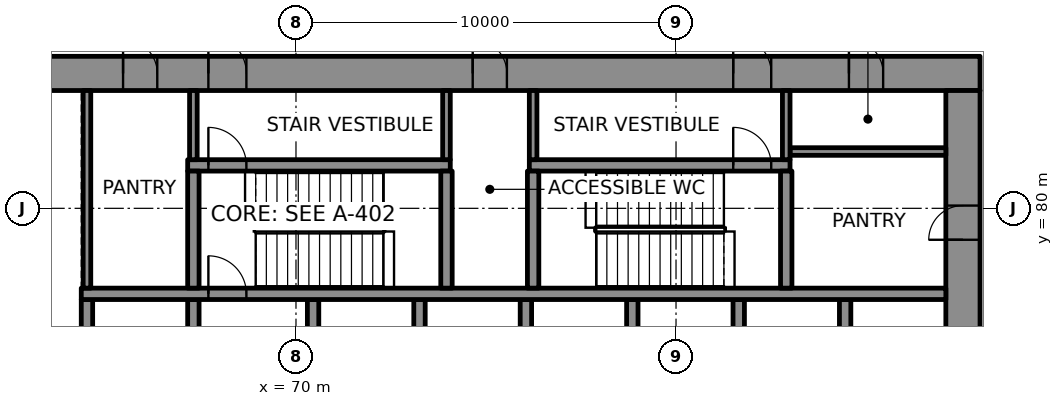
"""IFC4 building model, lengths in metres.
Left out: names, types, materials, properties, quantities, classifications, styles, units other than length and angle.
Written with IfcOpenShell. Run it as: python <this file> out.ifc"""

import sys

from ifc_helpers import new_model, si_unit, direction, frame, frame_2d, origin, place, context, subcontext, project, spatial, rectangle, extrude, element, fill, save


model = new_model("IFC4")
c1 = context("Model", 3, precision=1e-05, world=origin(), true_north=direction((0.0, 1.0)))
c2 = subcontext(c1, "Body", "Model", "MODEL_VIEW")
j1 = project(units=[si_unit("LENGTHUNIT", "METRE"), si_unit("PLANEANGLEUNIT", "RADIAN")], contexts=[c1])
p1 = place(None, origin())
s1 = spatial("IfcSite", under=j1, at=p1, CompositionType="ELEMENT")
p2 = place(p1, origin())
s2 = spatial("IfcBuilding", under=s1, at=p2, CompositionType="ELEMENT")
p3 = place(p2, frame((0.0, 0.0, 17.2)))
s3 = spatial("IfcBuildingStorey", under=s2, at=p3, CompositionType="ELEMENT", Elevation=17.2)
p4 = place(p3, frame((62.0, 83.55, 0.0), z_axis=(0.0, 0.0, 1.0), x_axis=(1.0, 0.0, 0.0)))
e1 = element("IfcWall", 1, at=p4, inside=s3, PredefinedType="SHEAR", context=c2, shape_type="SweptSolid", body=[
    extrude(rectangle(XDim=26.0, YDim=0.9, at=frame_2d((13.0, 0.0))), origin(), (0.0, 0.0, 1.0), 4.3),
])
p5 = place(p4, frame((5.695, 0.0, 0.0)))
e2 = element("IfcOpeningElement", 2, at=p5, cuts=e1, PredefinedType="OPENING", context=c2, shape_type="SweptSolid", body=[
    extrude(rectangle(XDim=1.0, YDim=2.1, at=frame_2d((0.5, 1.05))), frame((0.0, 0.46, 0.0), z_axis=(0.0, -1.0, 0.0), x_axis=(1.0, 0.0, 0.0)), (0.0, 0.0, 1.0), 0.92),
])
p6 = place(p4, frame((19.505, 0.0, 0.0)))
e3 = element("IfcOpeningElement", 3, at=p6, cuts=e1, PredefinedType="OPENING", context=c2, shape_type="SweptSolid", body=[
    extrude(rectangle(XDim=1.0, YDim=2.1, at=frame_2d((0.5, 1.05))), frame((0.0, 0.46, 0.0), z_axis=(0.0, -1.0, 0.0), x_axis=(1.0, 0.0, 0.0)), (0.0, 0.0, 1.0), 0.92),
])
p7 = place(p4, frame((3.45, 0.0, 0.0)))
e4 = element("IfcOpeningElement", 4, at=p7, cuts=e1, PredefinedType="OPENING", context=c2, shape_type="SweptSolid", body=[
    extrude(rectangle(XDim=0.9, YDim=2.1, at=frame_2d((0.45, 1.05))), frame((0.0, 0.46, 0.0), z_axis=(0.0, -1.0, 0.0), x_axis=(1.0, 0.0, 0.0)), (0.0, 0.0, 1.0), 0.92),
])
p8 = place(p4, frame((12.65, 0.0, 0.0)))
e5 = element("IfcOpeningElement", 5, at=p8, cuts=e1, PredefinedType="OPENING", context=c2, shape_type="SweptSolid", body=[
    extrude(rectangle(XDim=0.9, YDim=2.1, at=frame_2d((0.45, 1.05))), frame((0.0, 0.46, 0.0), z_axis=(0.0, -1.0, 0.0), x_axis=(1.0, 0.0, 0.0)), (0.0, 0.0, 1.0), 0.92),
])
p9 = place(p4, frame((22.55, 0.0, 0.0)))
e6 = element("IfcOpeningElement", 6, at=p9, cuts=e1, PredefinedType="OPENING", context=c2, shape_type="SweptSolid", body=[
    extrude(rectangle(XDim=0.9, YDim=2.1, at=frame_2d((0.45, 1.05))), frame((0.0, 0.46, 0.0), z_axis=(0.0, -1.0, 0.0), x_axis=(1.0, 0.0, 0.0)), (0.0, 0.0, 1.0), 0.92),
])
p10 = place(p3, frame((87.55, 66.9, 0.0), z_axis=(0.0, 0.0, 1.0), x_axis=(0.0, 1.0, 0.0)))
e7 = element("IfcWall", 7, at=p10, inside=s3, PredefinedType="SHEAR", context=c2, shape_type="SweptSolid", body=[
    extrude(rectangle(XDim=16.2, YDim=0.9, at=frame_2d((8.1, 0.0))), origin(), (0.0, 0.0, 1.0), 4.3),
])
p11 = place(p10, frame((5.5, 0.0, 0.0)))
e8 = element("IfcOpeningElement", 8, at=p11, cuts=e7, PredefinedType="OPENING", context=c2, shape_type="SweptSolid", body=[
    extrude(rectangle(XDim=1.8, YDim=2.1, at=frame_2d((0.9, 1.05))), frame((0.0, 0.46, 0.0), z_axis=(0.0, -1.0, 0.0), x_axis=(1.0, 0.0, 0.0)), (0.0, 0.0, 1.0), 0.92),
])
p12 = place(p10, frame((12.272, 0.0, 0.0)))
e9 = element("IfcOpeningElement", 9, at=p12, cuts=e7, PredefinedType="OPENING", context=c2, shape_type="SweptSolid", body=[
    extrude(rectangle(XDim=0.9, YDim=2.1, at=frame_2d((0.45, 1.05))), frame((0.0, 0.46, 0.0), z_axis=(0.0, -1.0, 0.0), x_axis=(1.0, 0.0, 0.0)), (0.0, 0.0, 1.0), 0.92),
])
for number, where, z_axis, x_axis in (
    (10, (64.5, 75.0, 0.0), (0.0, 0.0, 1.0), (0.0, 1.0, 0.0)),
    (11, (67.3, 75.0, 0.0), (0.0, 0.0, 1.0), (0.0, 1.0, 0.0)),
):
    element("IfcWall", number, at=place(p3, frame(where, z_axis=z_axis, x_axis=x_axis)), inside=s3, PredefinedType="SHEAR", context=c2, shape_type="SweptSolid", body=[
        extrude(rectangle(XDim=2.6, YDim=0.3, at=frame_2d((1.3, 0.0))), origin(), (0.0, 0.0, 1.0), 4.3),
    ])
p13 = place(p3, frame((70.45, 75.0, 0.0), z_axis=(0.0, 0.0, 1.0), x_axis=(0.0, 1.0, 0.0)))
e12 = element("IfcWall", 12, at=p13, inside=s3, PredefinedType="SHEAR", context=c2, shape_type="SweptSolid", body=[
    extrude(rectangle(XDim=2.6, YDim=0.3, at=frame_2d((1.3, 0.0))), origin(), (0.0, 0.0, 1.0), 4.3),
])
p14 = place(p13, frame((0.15, 0.0, 0.0)))
e13 = element("IfcOpeningElement", 13, at=p14, cuts=e12, PredefinedType="OPENING", context=c2, shape_type="SweptSolid", body=[
    extrude(rectangle(XDim=1.1, YDim=2.1, at=frame_2d((0.55, 1.05))), frame((0.0, 0.16, 0.0), z_axis=(0.0, -1.0, 0.0), x_axis=(1.0, 0.0, 0.0)), (0.0, 0.0, 1.0), 0.32),
])
for number, where, z_axis, x_axis in (
    (14, (73.25, 75.0, 0.0), (0.0, 0.0, 1.0), (0.0, 1.0, 0.0)),
    (15, (76.05, 75.0, 0.0), (0.0, 0.0, 1.0), (0.0, 1.0, 0.0)),
    (16, (78.85, 75.0, 0.0), (0.0, 0.0, 1.0), (0.0, 1.0, 0.0)),
    (17, (81.65, 75.0, 0.0), (0.0, 0.0, 1.0), (0.0, 1.0, 0.0)),
    (18, (84.45, 75.0, 0.0), (0.0, 0.0, 1.0), (0.0, 1.0, 0.0)),
):
    element("IfcWall", number, at=place(p3, frame(where, z_axis=z_axis, x_axis=x_axis)), inside=s3, PredefinedType="SHEAR", context=c2, shape_type="SweptSolid", body=[
        extrude(rectangle(XDim=2.6, YDim=0.3, at=frame_2d((1.3, 0.0))), origin(), (0.0, 0.0, 1.0), 4.3),
    ])
p15 = place(p3, frame((64.35, 77.75, 0.0), z_axis=(0.0, 0.0, 1.0), x_axis=(1.0, 0.0, 0.0)))
e19 = element("IfcWall", 19, at=p15, inside=s3, PredefinedType="SHEAR", context=c2, shape_type="SweptSolid", body=[
    extrude(rectangle(XDim=22.75, YDim=0.3, at=frame_2d((11.375, 0.0))), origin(), (0.0, 0.0, 1.0), 4.3),
])
p16 = place(p15, frame((3.345, 0.0, 0.0)))
e20 = element("IfcOpeningElement", 20, at=p16, cuts=e19, PredefinedType="OPENING", context=c2, shape_type="SweptSolid", body=[
    extrude(rectangle(XDim=1.0, YDim=2.1, at=frame_2d((0.5, 1.05))), frame((0.0, 0.16, 0.0), z_axis=(0.0, -1.0, 0.0), x_axis=(1.0, 0.0, 0.0)), (0.0, 0.0, 1.0), 0.32),
])
p17 = place(p3, frame((67.15, 81.13, 0.0), z_axis=(0.0, 0.0, 1.0), x_axis=(1.0, 0.0, 0.0)))
e21 = element("IfcWall", 21, at=p17, inside=s3, PredefinedType="SHEAR", context=c2, shape_type="SweptSolid", body=[
    extrude(rectangle(XDim=6.91, YDim=0.3, at=frame_2d((3.455, 0.0))), origin(), (0.0, 0.0, 1.0), 4.3),
])
p18 = place(p17, frame((0.545, 0.0, 0.0)))
e22 = element("IfcOpeningElement", 22, at=p18, cuts=e21, PredefinedType="OPENING", context=c2, shape_type="SweptSolid", body=[
    extrude(rectangle(XDim=1.0, YDim=2.1, at=frame_2d((0.5, 1.05))), frame((0.0, 0.16, 0.0), z_axis=(0.0, -1.0, 0.0), x_axis=(1.0, 0.0, 0.0)), (0.0, 0.0, 1.0), 0.32),
])
p19 = place(p3, frame((76.14, 81.13, 0.0), z_axis=(0.0, 0.0, 1.0), x_axis=(1.0, 0.0, 0.0)))
e23 = element("IfcWall", 23, at=p19, inside=s3, PredefinedType="SHEAR", context=c2, shape_type="SweptSolid", body=[
    extrude(rectangle(XDim=6.86, YDim=0.3, at=frame_2d((3.43, 0.0))), origin(), (0.0, 0.0, 1.0), 4.3),
])
p20 = place(p19, frame((5.365, 0.0, 0.0)))
e24 = element("IfcOpeningElement", 24, at=p20, cuts=e23, PredefinedType="OPENING", context=c2, shape_type="SweptSolid", body=[
    extrude(rectangle(XDim=1.0, YDim=2.1, at=frame_2d((0.5, 1.05))), frame((0.0, 0.16, 0.0), z_axis=(0.0, -1.0, 0.0), x_axis=(1.0, 0.0, 0.0)), (0.0, 0.0, 1.0), 0.32),
])
for number, where, z_axis, x_axis in (
    (25, (67.3, 77.9, 0.0), (0.0, 0.0, 1.0), (0.0, 1.0, 0.0)),
    (26, (73.96, 77.9, 0.0), (0.0, 0.0, 1.0), (0.0, 1.0, 0.0)),
    (27, (76.24, 77.9, 0.0), (0.0, 0.0, 1.0), (0.0, 1.0, 0.0)),
    (28, (82.9, 77.9, 0.0), (0.0, 0.0, 1.0), (0.0, 1.0, 0.0)),
):
    element("IfcWall", number, at=place(p3, frame(where, z_axis=z_axis, x_axis=x_axis)), inside=s3, PredefinedType="SHEAR", context=c2, shape_type="SweptSolid", body=[
        extrude(rectangle(XDim=3.08, YDim=0.3, at=frame_2d((1.54, 0.0))), origin(), (0.0, 0.0, 1.0), 4.3),
    ])
p21 = place(p3, frame((83.0, 81.495, 0.0), z_axis=(0.0, 0.0, 1.0), x_axis=(1.0, 0.0, 0.0)))
e29 = element("IfcWall", 29, at=p21, inside=s3, PredefinedType="PARTITIONING", context=c2, shape_type="SweptSolid", body=[
    extrude(rectangle(XDim=4.1, YDim=0.2, at=frame_2d((2.05, 0.0))), origin(), (0.0, 0.0, 1.0), 4.3),
])
p22 = place(p3, frame((64.5, 77.9, 0.0), z_axis=(0.0, 0.0, 1.0), x_axis=(0.0, 1.0, 0.0)))
e30 = element("IfcWall", 30, at=p22, inside=s3, PredefinedType="PARTITIONING", context=c2, shape_type="SweptSolid", body=[
    extrude(rectangle(XDim=5.2, YDim=0.2, at=frame_2d((2.6, 0.0))), origin(), (0.0, 0.0, 1.0), 4.3),
])
for number, where, z_axis, x_axis in (
    (31, (67.3, 81.28, 0.0), (0.0, 0.0, 1.0), (0.0, 1.0, 0.0)),
    (32, (73.96, 81.28, 0.0), (0.0, 0.0, 1.0), (0.0, 1.0, 0.0)),
    (33, (76.24, 81.28, 0.0), (0.0, 0.0, 1.0), (0.0, 1.0, 0.0)),
    (34, (82.9, 81.28, 0.0), (0.0, 0.0, 1.0), (0.0, 1.0, 0.0)),
):
    element("IfcWall", number, at=place(p3, frame(where, z_axis=z_axis, x_axis=x_axis)), inside=s3, PredefinedType="PARTITIONING", context=c2, shape_type="SweptSolid", body=[
        extrude(rectangle(XDim=1.82, YDim=0.2, at=frame_2d((0.91, 0.0))), origin(), (0.0, 0.0, 1.0), 4.3),
    ])
p23 = place(p3, frame((107.106, 62.36, 0.0), z_axis=(0.0, 0.0, 1.0), x_axis=(-0.49999992739, 0.866025445706, 0.0)))
e35 = element("IfcWall", 35, at=p23, inside=s3, PredefinedType="SOLIDWALL", context=c2, shape_type="SweptSolid", body=[
    extrude(rectangle(XDim=54.0, YDim=0.4, at=frame_2d((27.0, 0.0))), origin(), (0.0, 0.0, 1.0), 4.24),
])
p24 = place(p3, frame((112.496, 65.725, 0.0), z_axis=(0.0, 0.0, 1.0), x_axis=(-0.499998673217, 0.866026169802, 0.0)))
e36 = element("IfcWall", 36, at=p24, inside=s3, PredefinedType="PARTITIONING", context=c2, shape_type="SweptSolid", body=[
    extrude(rectangle(XDim=53.48, YDim=0.2, at=frame_2d((26.74, 0.0))), origin(), (0.0, 0.0, 1.0), 4.24),
])
p25 = place(p24, frame((13.08, 0.0, 0.0)))
e37 = element("IfcOpeningElement", 37, at=p25, cuts=e36, PredefinedType="OPENING", context=c2, shape_type="SweptSolid", body=[
    extrude(rectangle(XDim=1.0, YDim=2.1, at=frame_2d((0.5, 1.05))), frame((0.0, 0.11, 0.0), z_axis=(0.0, -1.0, 0.0), x_axis=(1.0, 0.0, 0.0)), (0.0, 0.0, 1.0), 0.22),
])
p26 = place(p24, frame((26.28, 0.0, 0.0)))
e38 = element("IfcOpeningElement", 38, at=p26, cuts=e36, PredefinedType="OPENING", context=c2, shape_type="SweptSolid", body=[
    extrude(rectangle(XDim=1.0, YDim=2.1, at=frame_2d((0.5, 1.05))), frame((0.0, 0.11, 0.0), z_axis=(0.0, -1.0, 0.0), x_axis=(1.0, 0.0, 0.0)), (0.0, 0.0, 1.0), 0.22),
])
p27 = place(p24, frame((43.88, 0.0, 0.0)))
e39 = element("IfcOpeningElement", 39, at=p27, cuts=e36, PredefinedType="OPENING", context=c2, shape_type="SweptSolid", body=[
    extrude(rectangle(XDim=1.0, YDim=2.1, at=frame_2d((0.5, 1.05))), frame((0.0, 0.11, 0.0), z_axis=(0.0, -1.0, 0.0), x_axis=(1.0, 0.0, 0.0)), (0.0, 0.0, 1.0), 0.22),
])
p28 = place(p24, frame((50.58, 0.0, 0.0)))
e40 = element("IfcOpeningElement", 40, at=p28, cuts=e36, PredefinedType="OPENING", context=c2, shape_type="SweptSolid", body=[
    extrude(rectangle(XDim=1.0, YDim=2.1, at=frame_2d((0.5, 1.05))), frame((0.0, 0.11, 0.0), z_axis=(0.0, -1.0, 0.0), x_axis=(1.0, 0.0, 0.0)), (0.0, 0.0, 1.0), 0.22),
])
p29 = place(p16, origin())
e41 = element("IfcDoor", 41, at=p29, inside=s3, OperationType="SINGLE_SWING_LEFT", PredefinedType="DOOR", context=c2, shape_type="SweptSolid", body=[
    extrude(rectangle(XDim=1.0, YDim=2.1, at=frame_2d((0.5, 1.05))), frame((0.0, 0.025, 0.0), z_axis=(0.0, -1.0, 0.0), x_axis=(1.0, 0.0, 0.0)), (0.0, 0.0, 1.0), 0.05),
])
fill(e20, e41)
p30 = place(p18, origin())
e42 = element("IfcDoor", 42, at=p30, inside=s3, OperationType="SINGLE_SWING_RIGHT", PredefinedType="DOOR", context=c2, shape_type="SweptSolid", body=[
    extrude(rectangle(XDim=1.0, YDim=2.1, at=frame_2d((0.5, 1.05))), frame((0.0, 0.025, 0.0), z_axis=(0.0, -1.0, 0.0), x_axis=(1.0, 0.0, 0.0)), (0.0, 0.0, 1.0), 0.05),
])
fill(e22, e42)
p31 = place(p5, origin())
e43 = element("IfcDoor", 43, at=p31, inside=s3, OperationType="SINGLE_SWING_LEFT", PredefinedType="DOOR", context=c2, shape_type="SweptSolid", body=[
    extrude(rectangle(XDim=1.0, YDim=2.1, at=frame_2d((0.5, 1.05))), frame((0.0, 0.17, 0.0), z_axis=(0.0, -1.0, 0.0), x_axis=(1.0, 0.0, 0.0)), (0.0, 0.0, 1.0), 0.34),
])
fill(e2, e43)
p32 = place(p20, origin())
e44 = element("IfcDoor", 44, at=p32, inside=s3, OperationType="SINGLE_SWING_RIGHT", PredefinedType="DOOR", context=c2, shape_type="SweptSolid", body=[
    extrude(rectangle(XDim=1.0, YDim=2.1, at=frame_2d((0.5, 1.05))), frame((0.0, 0.025, 0.0), z_axis=(0.0, -1.0, 0.0), x_axis=(1.0, 0.0, 0.0)), (0.0, 0.0, 1.0), 0.05),
])
fill(e24, e44)
p33 = place(p6, origin())
e45 = element("IfcDoor", 45, at=p33, inside=s3, OperationType="SINGLE_SWING_LEFT", PredefinedType="DOOR", context=c2, shape_type="SweptSolid", body=[
    extrude(rectangle(XDim=1.0, YDim=2.1, at=frame_2d((0.5, 1.05))), frame((0.0, 0.17, 0.0), z_axis=(0.0, -1.0, 0.0), x_axis=(1.0, 0.0, 0.0)), (0.0, 0.0, 1.0), 0.34),
])
fill(e3, e45)
p34 = place(p7, origin())
e46 = element("IfcDoor", 46, at=p34, inside=s3, OperationType="SINGLE_SWING_RIGHT", PredefinedType="DOOR", context=c2, shape_type="SweptSolid", body=[
    extrude(rectangle(XDim=0.9, YDim=2.1, at=frame_2d((0.45, 1.05))), frame((0.0, 0.17, 0.0), z_axis=(0.0, -1.0, 0.0), x_axis=(1.0, 0.0, 0.0)), (0.0, 0.0, 1.0), 0.34),
])
fill(e4, e46)
p35 = place(p8, origin())
e47 = element("IfcDoor", 47, at=p35, inside=s3, OperationType="SINGLE_SWING_LEFT", PredefinedType="DOOR", context=c2, shape_type="SweptSolid", body=[
    extrude(rectangle(XDim=0.9, YDim=2.1, at=frame_2d((0.45, 1.05))), frame((0.0, 0.17, 0.0), z_axis=(0.0, -1.0, 0.0), x_axis=(1.0, 0.0, 0.0)), (0.0, 0.0, 1.0), 0.34),
])
fill(e5, e47)
p36 = place(p12, origin())
e48 = element("IfcDoor", 48, at=p36, inside=s3, OperationType="SINGLE_SWING_RIGHT", PredefinedType="DOOR", context=c2, shape_type="SweptSolid", body=[
    extrude(rectangle(XDim=0.9, YDim=2.1, at=frame_2d((0.45, 1.05))), frame((0.0, 0.17, 0.0), z_axis=(0.0, -1.0, 0.0), x_axis=(1.0, 0.0, 0.0)), (0.0, 0.0, 1.0), 0.34),
])
fill(e9, e48)
p37 = place(p9, origin())
e49 = element("IfcDoor", 49, at=p37, inside=s3, OperationType="SINGLE_SWING_LEFT", PredefinedType="DOOR", context=c2, shape_type="SweptSolid", body=[
    extrude(rectangle(XDim=0.9, YDim=2.1, at=frame_2d((0.45, 1.05))), frame((0.0, 0.17, 0.0), z_axis=(0.0, -1.0, 0.0), x_axis=(1.0, 0.0, 0.0)), (0.0, 0.0, 1.0), 0.34),
])
fill(e6, e49)
save(model, sys.argv[1])
